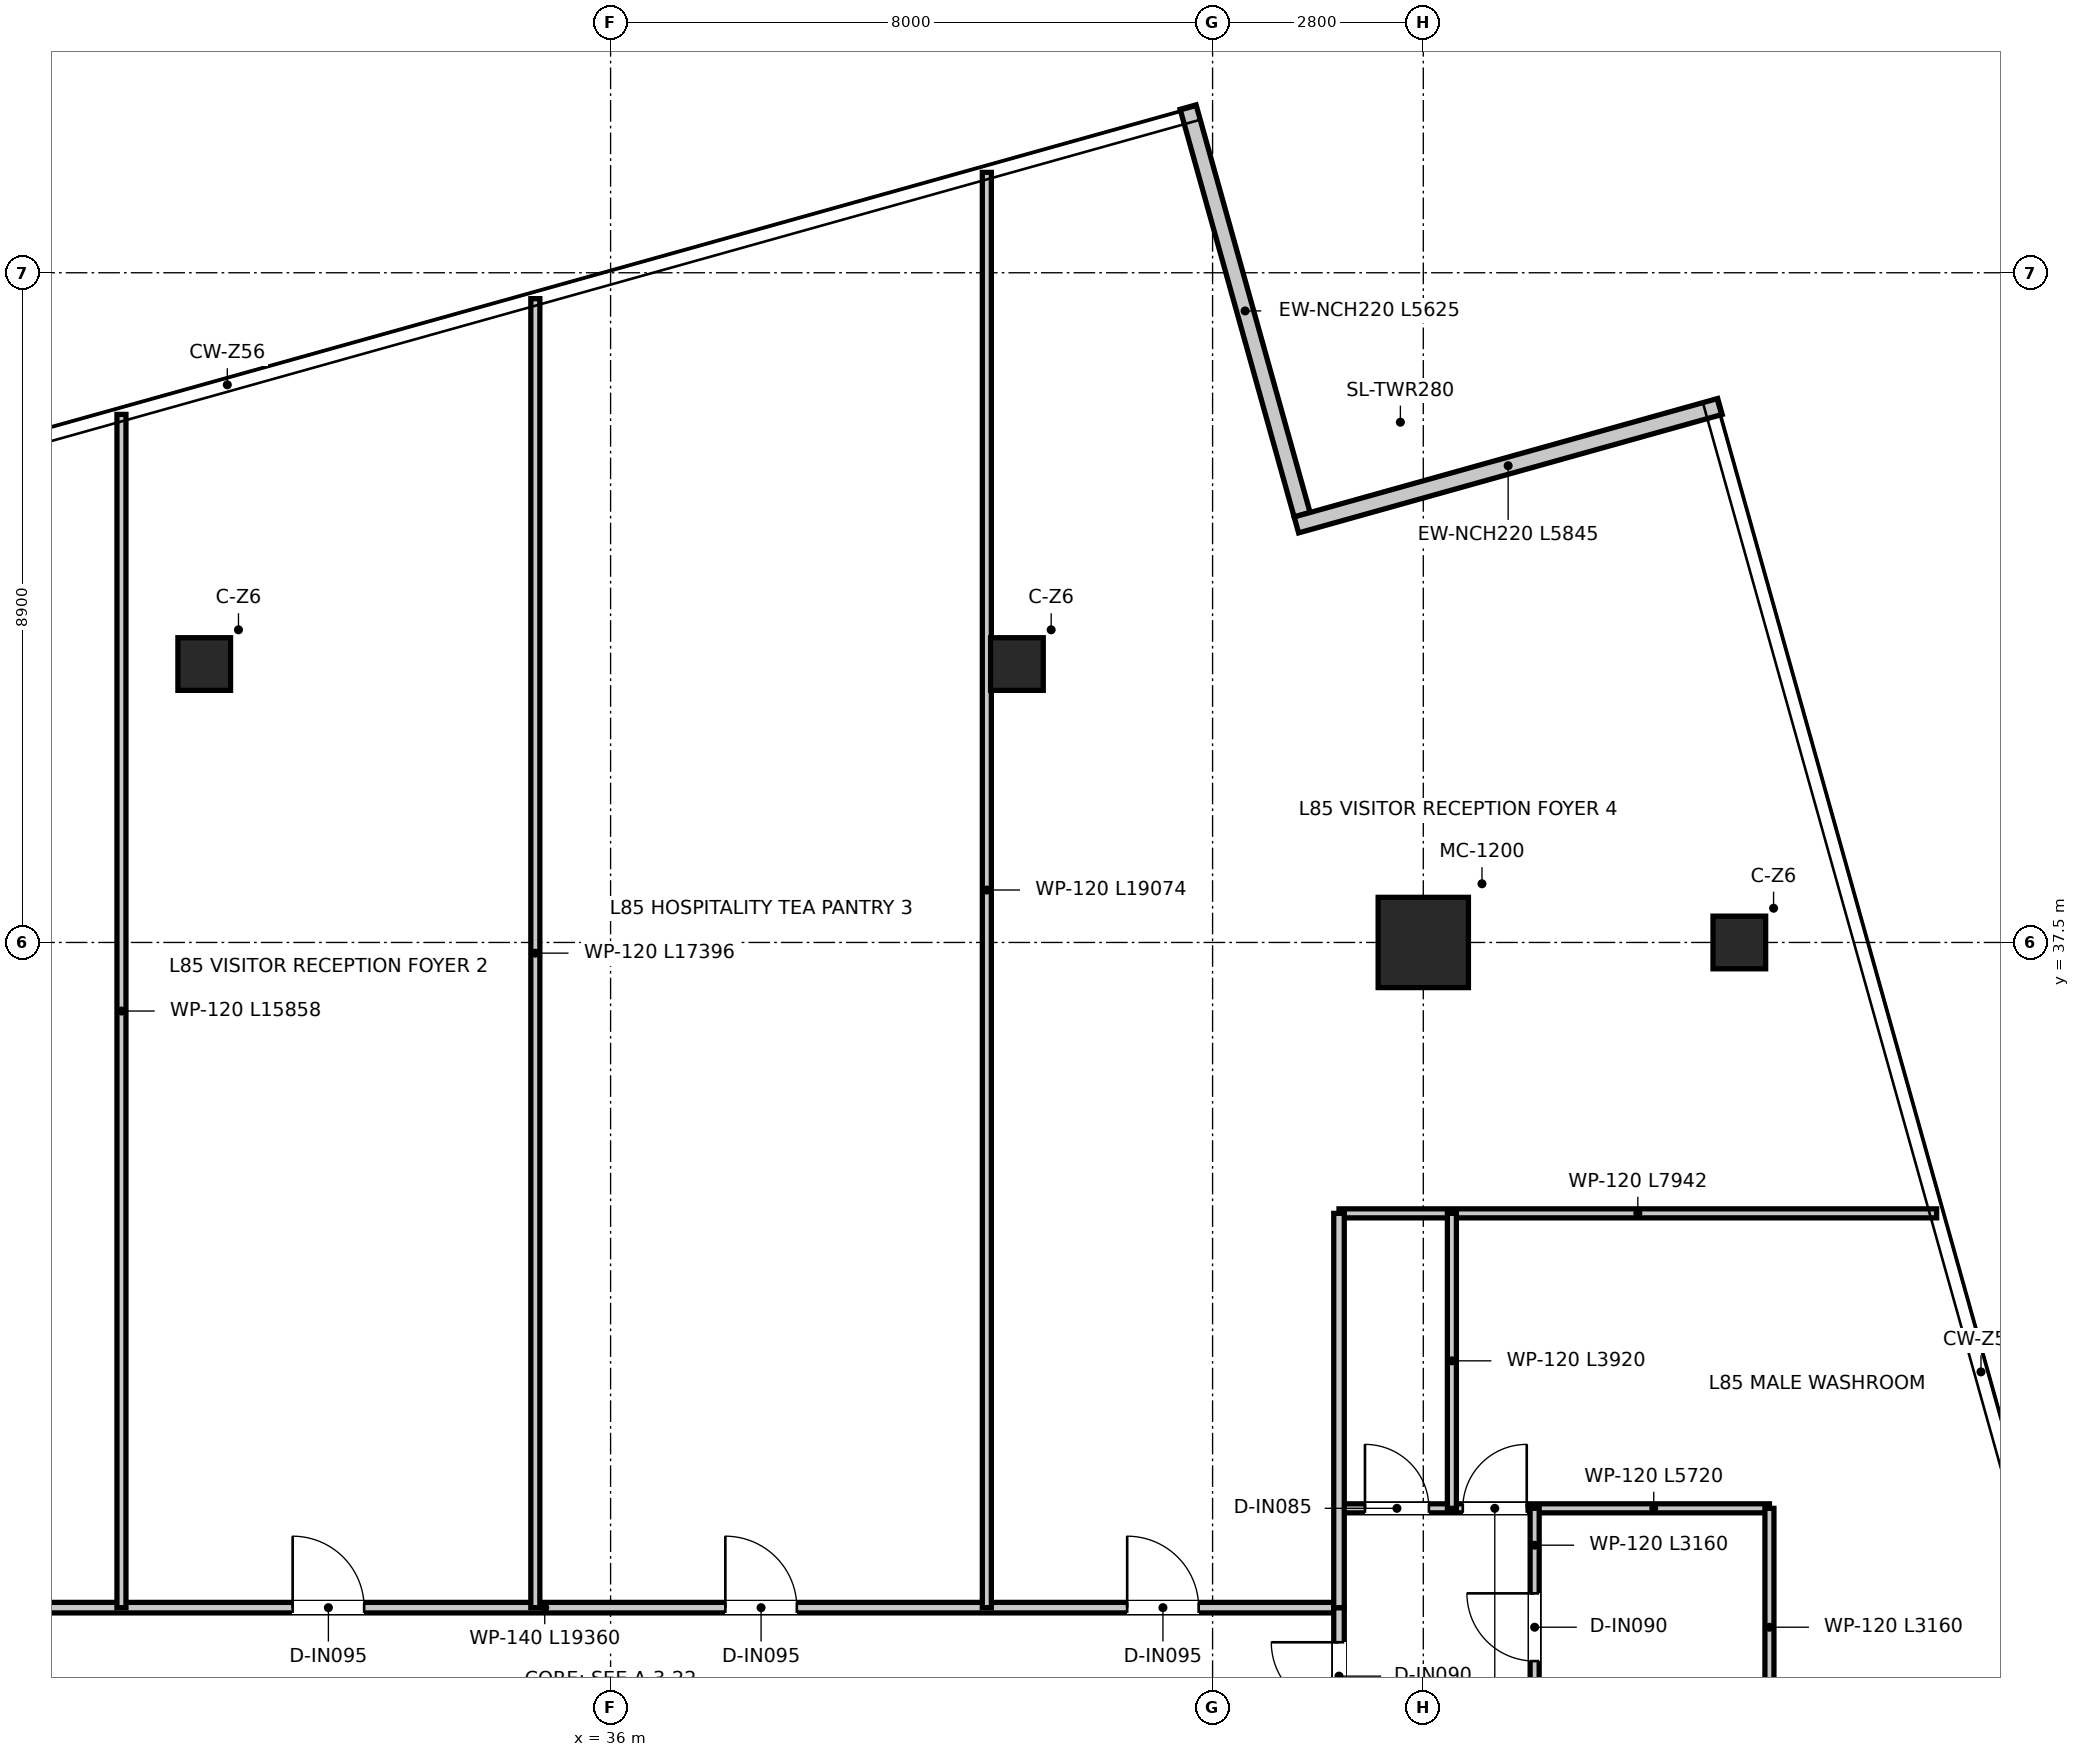
"""IFC4 building model, lengths in metres.
Left out: names, types, materials, properties, quantities, classifications, styles, units other than length and angle.
Written with IfcOpenShell. Run it as: python <this file> out.ifc"""

import sys

from ifc_helpers import new_model, si_unit, direction, frame, frame_2d, origin, origin_2d, place, context, subcontext, project, spatial, rectangle, extrude, source, transform, mapped, element, fill, save


model = new_model("IFC4")
c1 = context("Model", 3, precision=1e-05, world=origin(), true_north=direction((0.0, 1.0)))
c2 = subcontext(c1, "Body", "Model", "MODEL_VIEW")
j1 = project(units=[si_unit("LENGTHUNIT", "METRE"), si_unit("PLANEANGLEUNIT", "RADIAN")], contexts=[c1])
p1 = place(None, origin())
s1 = spatial("IfcSite", under=j1, at=p1, CompositionType="ELEMENT")
p2 = place(p1, origin())
s2 = spatial("IfcBuilding", under=s1, at=p2, CompositionType="ELEMENT")
p3 = place(p2, frame((0.0, 0.0, 347.45)))
s3 = spatial("IfcBuildingStorey", under=s2, at=p3, CompositionType="ELEMENT", Elevation=347.45)
m1 = source(origin(), c2, "Body", "SweptSolid", [
    extrude(rectangle(XDim=1.2, YDim=1.2, at=origin_2d()), origin(), (0.0, 0.0, 1.0), 3.95),
])
p4 = place(p3, frame((46.8, 37.5, 0.0), z_axis=(0.0, 0.0, 1.0), x_axis=(1.0, 0.0, 0.0)))
e1 = element("IfcColumn", 1, at=p4, inside=s3, PredefinedType="USERDEFINED", context=c2, shape_type="MappedRepresentation", body=[
    mapped(m1, transform((0.0, 0.0, 0.0), x_axis=(1.0, 0.0, 0.0), y_axis=(0.0, 1.0, 0.0), z_axis=(0.0, 0.0, 1.0), scale=1.0)),
])
m2 = source(origin(), c2, "Body", "SweptSolid", [
    extrude(rectangle(XDim=0.7, YDim=0.7, at=origin_2d()), origin(), (0.0, 0.0, 1.0), 3.95),
])
for number, where, z_axis, x_axis in (
    (2, (30.6, 41.2, 0.0), (0.0, 0.0, 1.0), (1.0, 0.0, 0.0)),
    (3, (41.4, 41.2, 0.0), (0.0, 0.0, 1.0), (1.0, 0.0, 0.0)),
    (4, (51.0, 37.5, 0.0), (0.0, 0.0, 1.0), (1.0, 0.0, 0.0)),
):
    element("IfcColumn", number, at=place(p3, frame(where, z_axis=z_axis, x_axis=x_axis)), inside=s3, PredefinedType="COLUMN", context=c2, shape_type="MappedRepresentation", body=[
        mapped(m2, transform((0.0, 0.0, 0.0), x_axis=(1.0, 0.0, 0.0), y_axis=(0.0, 1.0, 0.0), z_axis=(0.0, 0.0, 1.0), scale=1.0)),
    ])
p5 = place(p3, frame((45.19, 43.184, 0.0), z_axis=(0.0, 0.0, 1.0), x_axis=(-0.269351408795, 0.963041960965, 0.0)))
e5 = element("IfcWall", 5, at=p5, inside=s3, PredefinedType="ELEMENTEDWALL", context=c2, shape_type="SweptSolid", body=[
    extrude(rectangle(XDim=5.625, YDim=0.22, at=frame_2d((2.812, 0.0))), origin(), (0.0, 0.0, 1.0), 3.67),
])
p6 = place(p3, frame((50.742, 44.623, 0.0), z_axis=(0.0, 0.0, 1.0), x_axis=(-0.963047265714, -0.269332441418, 0.0)))
e6 = element("IfcWall", 6, at=p6, inside=s3, PredefinedType="ELEMENTEDWALL", context=c2, shape_type="SweptSolid", body=[
    extrude(rectangle(XDim=5.845, YDim=0.22, at=frame_2d((2.922, 0.0))), origin(), (0.0, 0.0, 1.0), 3.67),
])
p7 = place(p3, frame((26.32, 28.66, 0.0), z_axis=(0.0, 0.0, 1.0), x_axis=(1.0, 0.0, 0.0)))
e7 = element("IfcWall", 7, at=p7, inside=s3, PredefinedType="PARTITIONING", context=c2, shape_type="SweptSolid", body=[
    extrude(rectangle(XDim=19.36, YDim=0.14, at=frame_2d((9.68, 0.0))), origin(), (0.0, 0.0, 1.0), 3.18),
])
p8 = place(p7, frame((1.115, 0.0, 0.0)))
e8 = element("IfcOpeningElement", 8, at=p8, cuts=e7, PredefinedType="OPENING", context=c2, shape_type="SweptSolid", body=[
    extrude(rectangle(XDim=0.95, YDim=2.1, at=frame_2d((0.475, 1.05))), frame((0.0, 0.08, 0.0), z_axis=(0.0, -1.0, 0.0), x_axis=(1.0, 0.0, 0.0)), (0.0, 0.0, 1.0), 0.16),
])
p9 = place(p7, frame((5.455, 0.0, 0.0)))
e9 = element("IfcOpeningElement", 9, at=p9, cuts=e7, PredefinedType="OPENING", context=c2, shape_type="SweptSolid", body=[
    extrude(rectangle(XDim=0.95, YDim=2.1, at=frame_2d((0.475, 1.05))), frame((0.0, 0.08, 0.0), z_axis=(0.0, -1.0, 0.0), x_axis=(1.0, 0.0, 0.0)), (0.0, 0.0, 1.0), 0.16),
])
p10 = place(p7, frame((11.205, 0.0, 0.0)))
e10 = element("IfcOpeningElement", 10, at=p10, cuts=e7, PredefinedType="OPENING", context=c2, shape_type="SweptSolid", body=[
    extrude(rectangle(XDim=0.95, YDim=2.1, at=frame_2d((0.475, 1.05))), frame((0.0, 0.08, 0.0), z_axis=(0.0, -1.0, 0.0), x_axis=(1.0, 0.0, 0.0)), (0.0, 0.0, 1.0), 0.16),
])
p11 = place(p7, frame((16.545, 0.0, 0.0)))
e11 = element("IfcOpeningElement", 11, at=p11, cuts=e7, PredefinedType="OPENING", context=c2, shape_type="SweptSolid", body=[
    extrude(rectangle(XDim=0.95, YDim=2.1, at=frame_2d((0.475, 1.05))), frame((0.0, 0.08, 0.0), z_axis=(0.0, -1.0, 0.0), x_axis=(1.0, 0.0, 0.0)), (0.0, 0.0, 1.0), 0.16),
])
p12 = place(p3, frame((45.68, 13.0, 0.0), z_axis=(0.0, 0.0, 1.0), x_axis=(0.0, 1.0, 0.0)))
e12 = element("IfcWall", 12, at=p12, inside=s3, PredefinedType="PARTITIONING", context=c2, shape_type="SweptSolid", body=[
    extrude(rectangle(XDim=15.66, YDim=0.14, at=frame_2d((7.83, 0.0))), origin(), (0.0, 0.0, 1.0), 3.13),
])
p13 = place(p12, frame((14.3, 0.0, 0.0)))
e13 = element("IfcOpeningElement", 13, at=p13, cuts=e12, PredefinedType="OPENING", context=c2, shape_type="SweptSolid", body=[
    extrude(rectangle(XDim=0.9, YDim=2.1, at=frame_2d((0.45, 1.05))), frame((0.0, 0.08, 0.0), z_axis=(0.0, -1.0, 0.0), x_axis=(1.0, 0.0, 0.0)), (0.0, 0.0, 1.0), 0.16),
])
p14 = place(p12, frame((5.3, 0.0, 0.0)))
e14 = element("IfcOpeningElement", 14, at=p14, cuts=e12, PredefinedType="OPENING", context=c2, shape_type="SweptSolid", body=[
    extrude(rectangle(XDim=0.9, YDim=2.1, at=frame_2d((0.45, 1.05))), frame((0.0, 0.08, 0.0), z_axis=(0.0, -1.0, 0.0), x_axis=(1.0, 0.0, 0.0)), (0.0, 0.0, 1.0), 0.16),
])
p15 = place(p12, frame((8.75, 0.0, 0.0)))
e15 = element("IfcOpeningElement", 15, at=p15, cuts=e12, PredefinedType="OPENING", context=c2, shape_type="SweptSolid", body=[
    extrude(rectangle(XDim=0.9, YDim=2.1, at=frame_2d((0.45, 1.05))), frame((0.0, 0.08, 0.0), z_axis=(0.0, -1.0, 0.0), x_axis=(1.0, 0.0, 0.0)), (0.0, 0.0, 1.0), 0.16),
])
p16 = place(p12, frame((12.16, 0.0, 0.0)))
e16 = element("IfcOpeningElement", 16, at=p16, cuts=e12, PredefinedType="OPENING", context=c2, shape_type="SweptSolid", body=[
    extrude(rectangle(XDim=0.9, YDim=2.1, at=frame_2d((0.45, 1.05))), frame((0.0, 0.08, 0.0), z_axis=(0.0, -1.0, 0.0), x_axis=(1.0, 0.0, 0.0)), (0.0, 0.0, 1.0), 0.16),
])
p17 = place(p3, frame((45.68, 33.9, 0.0), z_axis=(0.0, 0.0, 1.0), x_axis=(1.0, 0.0, 0.0)))
e17 = element("IfcWall", 17, at=p17, inside=s3, PredefinedType="PARTITIONING", context=c2, shape_type="SweptSolid", body=[
    extrude(rectangle(XDim=7.942, YDim=0.12, at=frame_2d((3.971, 0.0))), origin(), (0.0, 0.0, 1.0), 3.13),
])
p18 = place(p3, frame((45.68, 29.98, 0.0), z_axis=(0.0, 0.0, 1.0), x_axis=(1.0, 0.0, 0.0)))
e18 = element("IfcWall", 18, at=p18, inside=s3, PredefinedType="PARTITIONING", context=c2, shape_type="SweptSolid", body=[
    extrude(rectangle(XDim=5.72, YDim=0.12, at=frame_2d((2.86, 0.0))), origin(), (0.0, 0.0, 1.0), 3.13),
])
p19 = place(p18, frame((1.645, 0.0, 0.0)))
e19 = element("IfcOpeningElement", 19, at=p19, cuts=e18, PredefinedType="OPENING", context=c2, shape_type="SweptSolid", body=[
    extrude(rectangle(XDim=0.85, YDim=2.1, at=frame_2d((0.425, 1.05))), frame((0.0, 0.07, 0.0), z_axis=(0.0, -1.0, 0.0), x_axis=(1.0, 0.0, 0.0)), (0.0, 0.0, 1.0), 0.14),
])
p20 = place(p18, frame((0.345, 0.0, 0.0)))
e20 = element("IfcOpeningElement", 20, at=p20, cuts=e18, PredefinedType="OPENING", context=c2, shape_type="SweptSolid", body=[
    extrude(rectangle(XDim=0.85, YDim=2.1, at=frame_2d((0.425, 1.05))), frame((0.0, 0.07, 0.0), z_axis=(0.0, -1.0, 0.0), x_axis=(1.0, 0.0, 0.0)), (0.0, 0.0, 1.0), 0.14),
])
p21 = place(p3, frame((51.4, 26.82, 0.0), z_axis=(0.0, 0.0, 1.0), x_axis=(0.0, 1.0, 0.0)))
e21 = element("IfcWall", 21, at=p21, inside=s3, PredefinedType="PARTITIONING", context=c2, shape_type="SweptSolid", body=[
    extrude(rectangle(XDim=3.16, YDim=0.12, at=frame_2d((1.58, 0.0))), origin(), (0.0, 0.0, 1.0), 3.67),
])
p22 = place(p3, frame((48.28, 26.82, 0.0), z_axis=(0.0, 0.0, 1.0), x_axis=(0.0, 1.0, 0.0)))
e22 = element("IfcWall", 22, at=p22, inside=s3, PredefinedType="PARTITIONING", context=c2, shape_type="SweptSolid", body=[
    extrude(rectangle(XDim=3.16, YDim=0.12, at=frame_2d((1.58, 0.0))), origin(), (0.0, 0.0, 1.0), 3.18),
])
p23 = place(p22, frame((1.13, 0.0, 0.0)))
e23 = element("IfcOpeningElement", 23, at=p23, cuts=e22, PredefinedType="OPENING", context=c2, shape_type="SweptSolid", body=[
    extrude(rectangle(XDim=0.9, YDim=2.1, at=frame_2d((0.45, 1.05))), frame((0.0, 0.07, 0.0), z_axis=(0.0, -1.0, 0.0), x_axis=(1.0, 0.0, 0.0)), (0.0, 0.0, 1.0), 0.14),
])
p24 = place(p3, frame((47.18, 29.98, 0.0), z_axis=(0.0, 0.0, 1.0), x_axis=(0.0, 1.0, 0.0)))
e24 = element("IfcWall", 24, at=p24, inside=s3, PredefinedType="PARTITIONING", context=c2, shape_type="SweptSolid", body=[
    extrude(rectangle(XDim=3.92, YDim=0.12, at=frame_2d((1.96, 0.0))), origin(), (0.0, 0.0, 1.0), 3.37),
])
p25 = place(p3, frame((45.68, 28.66, 0.0), z_axis=(0.0, 0.0, 1.0), x_axis=(0.0, 1.0, 0.0)))
e25 = element("IfcWall", 25, at=p25, inside=s3, PredefinedType="PARTITIONING", context=c2, shape_type="SweptSolid", body=[
    extrude(rectangle(XDim=5.24, YDim=0.14, at=frame_2d((2.62, 0.0))), origin(), (0.0, 0.0, 1.0), 3.43),
])
p26 = place(p3, frame((29.5, 28.66, 0.0), z_axis=(0.0, 0.0, 1.0), x_axis=(0.0, 1.0, 0.0)))
e26 = element("IfcWall", 26, at=p26, inside=s3, PredefinedType="PARTITIONING", context=c2, shape_type="SweptSolid", body=[
    extrude(rectangle(XDim=15.858, YDim=0.12, at=frame_2d((7.929, 0.0))), origin(), (0.0, 0.0, 1.0), 3.13),
])
p27 = place(p3, frame((35.0, 28.66, 0.0), z_axis=(0.0, 0.0, 1.0), x_axis=(0.0, 1.0, 0.0)))
e27 = element("IfcWall", 27, at=p27, inside=s3, PredefinedType="PARTITIONING", context=c2, shape_type="SweptSolid", body=[
    extrude(rectangle(XDim=17.396, YDim=0.12, at=frame_2d((8.698, 0.0))), origin(), (0.0, 0.0, 1.0), 3.13),
])
p28 = place(p3, frame((41.0, 28.66, 0.0), z_axis=(0.0, 0.0, 1.0), x_axis=(0.0, 1.0, 0.0)))
e28 = element("IfcWall", 28, at=p28, inside=s3, PredefinedType="PARTITIONING", context=c2, shape_type="SweptSolid", body=[
    extrude(rectangle(XDim=19.074, YDim=0.12, at=frame_2d((9.537, 0.0))), origin(), (0.0, 0.0, 1.0), 3.13),
])
p29 = place(p13, origin())
e29 = element("IfcDoor", 29, at=p29, inside=s3, OperationType="SINGLE_SWING_RIGHT", PredefinedType="DOOR", context=c2, shape_type="SweptSolid", body=[
    extrude(rectangle(XDim=0.9, YDim=2.1, at=frame_2d((0.45, 1.05))), frame((0.0, 0.025, 0.0), z_axis=(0.0, -1.0, 0.0), x_axis=(1.0, 0.0, 0.0)), (0.0, 0.0, 1.0), 0.05),
])
fill(e13, e29)
p30 = place(p19, origin())
e30 = element("IfcDoor", 30, at=p30, inside=s3, OperationType="SINGLE_SWING_RIGHT", PredefinedType="DOOR", context=c2, shape_type="SweptSolid", body=[
    extrude(rectangle(XDim=0.85, YDim=2.1, at=frame_2d((0.425, 1.05))), frame((0.0, 0.025, 0.0), z_axis=(0.0, -1.0, 0.0), x_axis=(1.0, 0.0, 0.0)), (0.0, 0.0, 1.0), 0.05),
])
fill(e19, e30)
p31 = place(p20, origin())
e31 = element("IfcDoor", 31, at=p31, inside=s3, OperationType="SINGLE_SWING_LEFT", PredefinedType="DOOR", context=c2, shape_type="SweptSolid", body=[
    extrude(rectangle(XDim=0.85, YDim=2.1, at=frame_2d((0.425, 1.05))), frame((0.0, 0.025, 0.0), z_axis=(0.0, -1.0, 0.0), x_axis=(1.0, 0.0, 0.0)), (0.0, 0.0, 1.0), 0.05),
])
fill(e20, e31)
p32 = place(p23, origin())
e32 = element("IfcDoor", 32, at=p32, inside=s3, OperationType="SINGLE_SWING_RIGHT", PredefinedType="DOOR", context=c2, shape_type="SweptSolid", body=[
    extrude(rectangle(XDim=0.9, YDim=2.1, at=frame_2d((0.45, 1.05))), frame((0.0, 0.025, 0.0), z_axis=(0.0, -1.0, 0.0), x_axis=(1.0, 0.0, 0.0)), (0.0, 0.0, 1.0), 0.05),
])
fill(e23, e32)
p33 = place(p9, origin())
e33 = element("IfcDoor", 33, at=p33, inside=s3, OperationType="SINGLE_SWING_LEFT", PredefinedType="DOOR", context=c2, shape_type="SweptSolid", body=[
    extrude(rectangle(XDim=0.95, YDim=2.1, at=frame_2d((0.475, 1.05))), frame((0.0, 0.025, 0.0), z_axis=(0.0, -1.0, 0.0), x_axis=(1.0, 0.0, 0.0)), (0.0, 0.0, 1.0), 0.05),
])
fill(e9, e33)
p34 = place(p10, origin())
e34 = element("IfcDoor", 34, at=p34, inside=s3, OperationType="SINGLE_SWING_LEFT", PredefinedType="DOOR", context=c2, shape_type="SweptSolid", body=[
    extrude(rectangle(XDim=0.95, YDim=2.1, at=frame_2d((0.475, 1.05))), frame((0.0, 0.025, 0.0), z_axis=(0.0, -1.0, 0.0), x_axis=(1.0, 0.0, 0.0)), (0.0, 0.0, 1.0), 0.05),
])
fill(e10, e34)
p35 = place(p11, origin())
e35 = element("IfcDoor", 35, at=p35, inside=s3, OperationType="SINGLE_SWING_LEFT", PredefinedType="DOOR", context=c2, shape_type="SweptSolid", body=[
    extrude(rectangle(XDim=0.95, YDim=2.1, at=frame_2d((0.475, 1.05))), frame((0.0, 0.025, 0.0), z_axis=(0.0, -1.0, 0.0), x_axis=(1.0, 0.0, 0.0)), (0.0, 0.0, 1.0), 0.05),
])
fill(e11, e35)
save(model, sys.argv[1])
